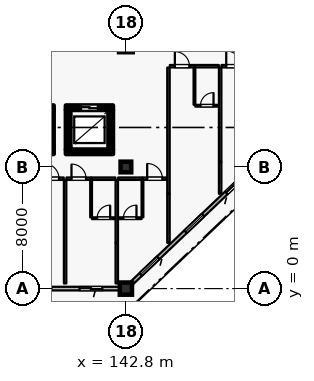
"""IFC4 building model, lengths in metres.
Left out: names, types, materials, properties, quantities, classifications, styles, units other than length and angle.
Written with IfcOpenShell. Run it as: python <this file> out.ifc"""

import sys

from ifc_helpers import new_model, si_unit, direction, frame, frame_2d, origin, origin_2d, place, context, subcontext, project, spatial, rectangle, extrude, element, fill, save


model = new_model("IFC4")
c1 = context("Model", 3, precision=1e-05, world=origin(), true_north=direction((0.0, 1.0)))
c2 = subcontext(c1, "Body", "Model", "MODEL_VIEW")
j1 = project(units=[si_unit("LENGTHUNIT", "METRE"), si_unit("PLANEANGLEUNIT", "RADIAN")], contexts=[c1])
p1 = place(None, origin())
s1 = spatial("IfcSite", under=j1, at=p1, CompositionType="ELEMENT")
p2 = place(p1, origin())
s2 = spatial("IfcBuilding", under=s1, at=p2, CompositionType="ELEMENT")
p3 = place(p2, frame((0.0, 0.0, 25.2)))
s3 = spatial("IfcBuildingStorey", under=s2, at=p3, CompositionType="ELEMENT", Elevation=25.2)
p4 = place(p3, frame((142.8, 0.0, 0.0), z_axis=(0.0, 0.0, 1.0), x_axis=(1.0, 0.0, 0.0)))
e1 = element("IfcColumn", 1, at=p4, inside=s3, PredefinedType="COLUMN", context=c2, shape_type="SweptSolid", body=[
    extrude(rectangle(XDim=0.8, YDim=0.8, at=origin_2d()), origin(), (0.0, 0.0, 1.0), 3.6),
])
p5 = place(p3, frame((142.8, 8.0, 0.0), z_axis=(0.0, 0.0, 1.0), x_axis=(1.0, 0.0, 0.0)))
e2 = element("IfcColumn", 2, at=p5, inside=s3, PredefinedType="COLUMN", context=c2, shape_type="SweptSolid", body=[
    extrude(rectangle(XDim=0.7, YDim=0.7, at=origin_2d()), origin(), (0.0, 0.0, 1.0), 3.6),
])
p6 = place(p3, frame((142.4, 0.0, 0.0), z_axis=(0.0, 0.0, 1.0), x_axis=(-1.0, 0.0, 0.0)))
e3 = element("IfcWall", 3, at=p6, inside=s3, PredefinedType="SOLIDWALL", context=c2, shape_type="SweptSolid", body=[
    extrude(rectangle(XDim=7.6, YDim=0.24, at=frame_2d((3.8, 0.0))), origin(), (0.0, 0.0, 1.0), 2.93),
])
p7 = place(p6, frame((1.15, 0.0, 0.0)))
e4 = element("IfcOpeningElement", 4, at=p7, cuts=e3, PredefinedType="OPENING", context=c2, shape_type="SweptSolid", body=[
    extrude(rectangle(XDim=1.5, YDim=2.25, at=frame_2d((0.75, 1.125))), frame((0.0, 0.13, 0.0), z_axis=(0.0, -1.0, 0.0), x_axis=(1.0, 0.0, 0.0)), (0.0, 0.0, 1.0), 0.26),
])
p8 = place(p6, frame((4.5, 0.0, 0.8)))
e5 = element("IfcOpeningElement", 5, at=p8, cuts=e3, PredefinedType="OPENING", context=c2, shape_type="SweptSolid", body=[
    extrude(rectangle(XDim=1.6, YDim=1.6, at=frame_2d((0.8, 0.8))), frame((0.0, 0.13, 0.0), z_axis=(0.0, -1.0, 0.0), x_axis=(1.0, 0.0, 0.0)), (0.0, 0.0, 1.0), 0.26),
])
p9 = place(p3, frame((150.8, 7.619, 0.0), z_axis=(0.0, 0.0, 1.0), x_axis=(-0.724156739794, -0.689635422677, 0.0)))
e6 = element("IfcWall", 6, at=p9, inside=s3, PredefinedType="SOLIDWALL", context=c2, shape_type="SweptSolid", body=[
    extrude(rectangle(XDim=10.495, YDim=0.24, at=frame_2d((5.248, 0.0))), origin(), (0.0, 0.0, 1.0), 2.93),
])
p10 = place(p9, frame((0.424, 0.0, 0.0)))
e7 = element("IfcOpeningElement", 7, at=p10, cuts=e6, PredefinedType="OPENING", context=c2, shape_type="SweptSolid", body=[
    extrude(rectangle(XDim=1.5, YDim=2.25, at=frame_2d((0.75, 1.125))), frame((0.0, 0.13, 0.0), z_axis=(0.0, -1.0, 0.0), x_axis=(1.0, 0.0, 0.0)), (0.0, 0.0, 1.0), 0.26),
])
p11 = place(p9, frame((4.033, 0.0, 0.8)))
e8 = element("IfcOpeningElement", 8, at=p11, cuts=e6, PredefinedType="OPENING", context=c2, shape_type="SweptSolid", body=[
    extrude(rectangle(XDim=1.6, YDim=1.6, at=frame_2d((0.8, 0.8))), frame((0.0, 0.13, 0.0), z_axis=(0.0, -1.0, 0.0), x_axis=(1.0, 0.0, 0.0)), (0.0, 0.0, 1.0), 0.26),
])
p12 = place(p9, frame((8.107, 0.0, 0.8)))
e9 = element("IfcOpeningElement", 9, at=p12, cuts=e6, PredefinedType="OPENING", context=c2, shape_type="SweptSolid", body=[
    extrude(rectangle(XDim=1.6, YDim=1.6, at=frame_2d((0.8, 0.8))), frame((0.0, 0.13, 0.0), z_axis=(0.0, -1.0, 0.0), x_axis=(1.0, 0.0, 0.0)), (0.0, 0.0, 1.0), 0.26),
])
p13 = place(p3, frame((134.95, 9.0, 0.0), z_axis=(0.0, 0.0, 1.0), x_axis=(1.0, 0.0, 0.0)))
e10 = element("IfcWall", 10, at=p13, inside=s3, PredefinedType="SHEAR", context=c2, shape_type="SweptSolid", body=[
    extrude(rectangle(XDim=3.1, YDim=0.3, at=frame_2d((1.55, 0.0))), origin(), (0.0, 0.0, 1.0), 3.335),
])
p14 = place(p3, frame((137.9, 9.155, 0.0), z_axis=(0.0, 0.0, 1.0), x_axis=(0.0, 1.0, 0.0)))
e11 = element("IfcWall", 11, at=p14, inside=s3, PredefinedType="SHEAR", context=c2, shape_type="SweptSolid", body=[
    extrude(rectangle(XDim=2.59, YDim=0.3, at=frame_2d((1.295, 0.0))), origin(), (0.0, 0.0, 1.0), 3.335),
])
p15 = place(p3, frame((138.05, 11.9, 0.0), z_axis=(0.0, 0.0, 1.0), x_axis=(-1.0, 0.0, 0.0)))
e12 = element("IfcWall", 12, at=p15, inside=s3, PredefinedType="SHEAR", context=c2, shape_type="SweptSolid", body=[
    extrude(rectangle(XDim=3.1, YDim=0.3, at=frame_2d((1.55, 0.0))), origin(), (0.0, 0.0, 1.0), 3.335),
])
p16 = place(p15, frame((1.0, 0.0, 0.0)))
e13 = element("IfcOpeningElement", 13, at=p16, cuts=e12, PredefinedType="OPENING", context=c2, shape_type="SweptSolid", body=[
    extrude(rectangle(XDim=1.1, YDim=2.2, at=frame_2d((0.55, 1.1))), frame((0.0, 0.16, 0.0), z_axis=(0.0, -1.0, 0.0), x_axis=(1.0, 0.0, 0.0)), (0.0, 0.0, 1.0), 0.32),
])
p17 = place(p3, frame((138.85, 9.0, 0.0), z_axis=(0.0, 0.0, 1.0), x_axis=(1.0, 0.0, 0.0)))
e14 = element("IfcWall", 14, at=p17, inside=s3, PredefinedType="SHEAR", context=c2, shape_type="SweptSolid", body=[
    extrude(rectangle(XDim=3.1, YDim=0.3, at=frame_2d((1.55, 0.0))), origin(), (0.0, 0.0, 1.0), 3.335),
])
p18 = place(p3, frame((141.8, 9.155, 0.0), z_axis=(0.0, 0.0, 1.0), x_axis=(0.0, 1.0, 0.0)))
e15 = element("IfcWall", 15, at=p18, inside=s3, PredefinedType="SHEAR", context=c2, shape_type="SweptSolid", body=[
    extrude(rectangle(XDim=2.59, YDim=0.3, at=frame_2d((1.295, 0.0))), origin(), (0.0, 0.0, 1.0), 3.335),
])
p19 = place(p3, frame((141.95, 11.9, 0.0), z_axis=(0.0, 0.0, 1.0), x_axis=(-1.0, 0.0, 0.0)))
e16 = element("IfcWall", 16, at=p19, inside=s3, PredefinedType="SHEAR", context=c2, shape_type="SweptSolid", body=[
    extrude(rectangle(XDim=3.1, YDim=0.3, at=frame_2d((1.55, 0.0))), origin(), (0.0, 0.0, 1.0), 3.335),
])
p20 = place(p19, frame((1.0, 0.0, 0.0)))
e17 = element("IfcOpeningElement", 17, at=p20, cuts=e16, PredefinedType="OPENING", context=c2, shape_type="SweptSolid", body=[
    extrude(rectangle(XDim=1.1, YDim=2.2, at=frame_2d((0.55, 1.1))), frame((0.0, 0.16, 0.0), z_axis=(0.0, -1.0, 0.0), x_axis=(1.0, 0.0, 0.0)), (0.0, 0.0, 1.0), 0.32),
])
p21 = place(p3, frame((139.0, 11.745, 0.0), z_axis=(0.0, 0.0, 1.0), x_axis=(0.0, -1.0, 0.0)))
e18 = element("IfcWall", 18, at=p21, inside=s3, PredefinedType="SHEAR", context=c2, shape_type="SweptSolid", body=[
    extrude(rectangle(XDim=2.59, YDim=0.3, at=frame_2d((1.295, 0.0))), origin(), (0.0, 0.0, 1.0), 3.335),
])
p22 = place(p3, frame((137.09, 7.23, 0.0), z_axis=(0.0, 0.0, 1.0), x_axis=(1.0, 0.0, 0.0)))
e19 = element("IfcWall", 19, at=p22, inside=s3, PredefinedType="PARTITIONING", context=c2, shape_type="SweptSolid", body=[
    extrude(rectangle(XDim=1.62, YDim=0.16, at=frame_2d((0.81, 0.0))), origin(), (0.0, 0.0, 1.0), 3.335),
])
p23 = place(p22, frame((0.31, 0.0, 0.0)))
e20 = element("IfcOpeningElement", 20, at=p23, cuts=e19, PredefinedType="OPENING", context=c2, shape_type="SweptSolid", body=[
    extrude(rectangle(XDim=1.0, YDim=2.25, at=frame_2d((0.5, 1.125))), frame((0.0, 0.09, 0.0), z_axis=(0.0, -1.0, 0.0), x_axis=(1.0, 0.0, 0.0)), (0.0, 0.0, 1.0), 0.18),
])
p24 = place(p3, frame((138.89, 7.23, 0.0), z_axis=(0.0, 0.0, 1.0), x_axis=(1.0, 0.0, 0.0)))
e21 = element("IfcWall", 21, at=p24, inside=s3, PredefinedType="PARTITIONING", context=c2, shape_type="SweptSolid", body=[
    extrude(rectangle(XDim=1.62, YDim=0.16, at=frame_2d((0.81, 0.0))), origin(), (0.0, 0.0, 1.0), 3.335),
])
p25 = place(p24, frame((0.33, 0.0, 0.0)))
e22 = element("IfcOpeningElement", 22, at=p25, cuts=e21, PredefinedType="OPENING", context=c2, shape_type="SweptSolid", body=[
    extrude(rectangle(XDim=0.96, YDim=2.2, at=frame_2d((0.48, 1.1))), frame((0.0, 0.09, 0.0), z_axis=(0.0, -1.0, 0.0), x_axis=(1.0, 0.0, 0.0)), (0.0, 0.0, 1.0), 0.18),
])
p26 = place(p3, frame((140.52, 7.23, 0.0), z_axis=(0.0, 0.0, 1.0), x_axis=(1.0, 0.0, 0.0)))
e23 = element("IfcWall", 23, at=p26, inside=s3, PredefinedType="PARTITIONING", context=c2, shape_type="SweptSolid", body=[
    extrude(rectangle(XDim=1.59, YDim=0.16, at=frame_2d((0.795, 0.0))), origin(), (0.0, 0.0, 1.0), 3.335),
])
p27 = place(p3, frame((140.51, 4.69, 0.0), z_axis=(0.0, 0.0, 1.0), x_axis=(0.0, 1.0, 0.0)))
e24 = element("IfcWall", 24, at=p27, inside=s3, PredefinedType="PARTITIONING", context=c2, shape_type="SweptSolid", body=[
    extrude(rectangle(XDim=2.45, YDim=0.115, at=frame_2d((1.225, 0.0))), origin(), (0.0, 0.0, 1.0), 3.335),
])
p28 = place(p3, frame((140.57, 4.63, 0.0), z_axis=(0.0, 0.0, 1.0), x_axis=(1.0, 0.0, 0.0)))
e25 = element("IfcWall", 25, at=p28, inside=s3, PredefinedType="PARTITIONING", context=c2, shape_type="SweptSolid", body=[
    extrude(rectangle(XDim=1.53, YDim=0.115, at=frame_2d((0.765, 0.0))), origin(), (0.0, 0.0, 1.0), 3.335),
])
p29 = place(p28, frame((0.335, 0.0, 0.0)))
e26 = element("IfcOpeningElement", 26, at=p29, cuts=e25, PredefinedType="OPENING", context=c2, shape_type="SweptSolid", body=[
    extrude(rectangle(XDim=0.86, YDim=2.12, at=frame_2d((0.43, 1.06))), frame((0.0, 0.067, 0.0), z_axis=(0.0, -1.0, 0.0), x_axis=(1.0, 0.0, 0.0)), (0.0, 0.0, 1.0), 0.135),
])
p30 = place(p3, frame((138.8, 0.34, 0.0), z_axis=(0.0, 0.0, 1.0), x_axis=(0.0, 1.0, 0.0)))
e27 = element("IfcWall", 27, at=p30, inside=s3, PredefinedType="PARTITIONING", context=c2, shape_type="SweptSolid", body=[
    extrude(rectangle(XDim=6.8, YDim=0.16, at=frame_2d((3.4, 0.0))), origin(), (0.0, 0.0, 1.0), 3.335),
])
p31 = place(p3, frame((142.2, 0.34, 0.0), z_axis=(0.0, 0.0, 1.0), x_axis=(0.0, 1.0, 0.0)))
e28 = element("IfcWall", 28, at=p31, inside=s3, PredefinedType="PARTITIONING", context=c2, shape_type="SweptSolid", body=[
    extrude(rectangle(XDim=2.66, YDim=0.16, at=frame_2d((1.33, 0.0))), origin(), (0.0, 0.0, 1.0), 3.335),
])
p32 = place(p3, frame((142.29, 7.23, 0.0), z_axis=(0.0, 0.0, 1.0), x_axis=(1.0, 0.0, 0.0)))
e29 = element("IfcWall", 29, at=p32, inside=s3, PredefinedType="PARTITIONING", context=c2, shape_type="SweptSolid", body=[
    extrude(rectangle(XDim=1.59, YDim=0.16, at=frame_2d((0.795, 0.0))), origin(), (0.0, 0.0, 1.0), 3.335),
])
p33 = place(p3, frame((143.89, 7.23, 0.0), z_axis=(0.0, 0.0, 1.0), x_axis=(1.0, 0.0, 0.0)))
e30 = element("IfcWall", 30, at=p33, inside=s3, PredefinedType="PARTITIONING", context=c2, shape_type="SweptSolid", body=[
    extrude(rectangle(XDim=1.62, YDim=0.16, at=frame_2d((0.81, 0.0))), origin(), (0.0, 0.0, 1.0), 3.335),
])
p34 = place(p33, frame((0.31, 0.0, 0.0)))
e31 = element("IfcOpeningElement", 31, at=p34, cuts=e30, PredefinedType="OPENING", context=c2, shape_type="SweptSolid", body=[
    extrude(rectangle(XDim=1.0, YDim=2.25, at=frame_2d((0.5, 1.125))), frame((0.0, 0.09, 0.0), z_axis=(0.0, -1.0, 0.0), x_axis=(1.0, 0.0, 0.0)), (0.0, 0.0, 1.0), 0.18),
])
p35 = place(p3, frame((143.89, 4.69, 0.0), z_axis=(0.0, 0.0, 1.0), x_axis=(0.0, 1.0, 0.0)))
e32 = element("IfcWall", 32, at=p35, inside=s3, PredefinedType="PARTITIONING", context=c2, shape_type="SweptSolid", body=[
    extrude(rectangle(XDim=2.45, YDim=0.115, at=frame_2d((1.225, 0.0))), origin(), (0.0, 0.0, 1.0), 3.335),
])
p36 = place(p3, frame((142.3, 4.63, 0.0), z_axis=(0.0, 0.0, 1.0), x_axis=(1.0, 0.0, 0.0)))
e33 = element("IfcWall", 33, at=p36, inside=s3, PredefinedType="PARTITIONING", context=c2, shape_type="SweptSolid", body=[
    extrude(rectangle(XDim=1.53, YDim=0.115, at=frame_2d((0.765, 0.0))), origin(), (0.0, 0.0, 1.0), 3.335),
])
p37 = place(p36, frame((0.335, 0.0, 0.0)))
e34 = element("IfcOpeningElement", 34, at=p37, cuts=e33, PredefinedType="OPENING", context=c2, shape_type="SweptSolid", body=[
    extrude(rectangle(XDim=0.86, YDim=2.12, at=frame_2d((0.43, 1.06))), frame((0.0, 0.067, 0.0), z_axis=(0.0, -1.0, 0.0), x_axis=(1.0, 0.0, 0.0)), (0.0, 0.0, 1.0), 0.135),
])
p38 = place(p3, frame((142.2, 3.01, 0.0), z_axis=(0.0, 0.0, 1.0), x_axis=(0.0, 1.0, 0.0)))
e35 = element("IfcWall", 35, at=p38, inside=s3, PredefinedType="PARTITIONING", context=c2, shape_type="SweptSolid", body=[
    extrude(rectangle(XDim=4.13, YDim=0.16, at=frame_2d((2.065, 0.0))), origin(), (0.0, 0.0, 1.0), 3.335),
])
p39 = place(p3, frame((145.6, 3.01, 0.0), z_axis=(0.0, 0.0, 1.0), x_axis=(0.0, 1.0, 0.0)))
e36 = element("IfcWall", 36, at=p39, inside=s3, PredefinedType="PARTITIONING", context=c2, shape_type="SweptSolid", body=[
    extrude(rectangle(XDim=3.22, YDim=0.16, at=frame_2d((1.61, 0.0))), origin(), (0.0, 0.0, 1.0), 3.335),
])
p40 = place(p3, frame((145.69, 14.63, 0.0), z_axis=(0.0, 0.0, 1.0), x_axis=(1.0, 0.0, 0.0)))
e37 = element("IfcWall", 37, at=p40, inside=s3, PredefinedType="PARTITIONING", context=c2, shape_type="SweptSolid", body=[
    extrude(rectangle(XDim=1.62, YDim=0.16, at=frame_2d((0.81, 0.0))), origin(), (0.0, 0.0, 1.0), 3.335),
])
p41 = place(p40, frame((0.33, 0.0, 0.0)))
e38 = element("IfcOpeningElement", 38, at=p41, cuts=e37, PredefinedType="OPENING", context=c2, shape_type="SweptSolid", body=[
    extrude(rectangle(XDim=0.96, YDim=2.2, at=frame_2d((0.48, 1.1))), frame((0.0, 0.09, 0.0), z_axis=(0.0, -1.0, 0.0), x_axis=(1.0, 0.0, 0.0)), (0.0, 0.0, 1.0), 0.18),
])
p42 = place(p3, frame((147.32, 14.63, 0.0), z_axis=(0.0, 0.0, 1.0), x_axis=(1.0, 0.0, 0.0)))
e39 = element("IfcWall", 39, at=p42, inside=s3, PredefinedType="PARTITIONING", context=c2, shape_type="SweptSolid", body=[
    extrude(rectangle(XDim=1.59, YDim=0.16, at=frame_2d((0.795, 0.0))), origin(), (0.0, 0.0, 1.0), 3.335),
])
p43 = place(p3, frame((147.31, 12.09, 0.0), z_axis=(0.0, 0.0, 1.0), x_axis=(0.0, 1.0, 0.0)))
e40 = element("IfcWall", 40, at=p43, inside=s3, PredefinedType="PARTITIONING", context=c2, shape_type="SweptSolid", body=[
    extrude(rectangle(XDim=2.45, YDim=0.115, at=frame_2d((1.225, 0.0))), origin(), (0.0, 0.0, 1.0), 3.335),
])
p44 = place(p3, frame((147.37, 12.03, 0.0), z_axis=(0.0, 0.0, 1.0), x_axis=(1.0, 0.0, 0.0)))
e41 = element("IfcWall", 41, at=p44, inside=s3, PredefinedType="PARTITIONING", context=c2, shape_type="SweptSolid", body=[
    extrude(rectangle(XDim=1.53, YDim=0.115, at=frame_2d((0.765, 0.0))), origin(), (0.0, 0.0, 1.0), 3.335),
])
p45 = place(p44, frame((0.335, 0.0, 0.0)))
e42 = element("IfcOpeningElement", 42, at=p45, cuts=e41, PredefinedType="OPENING", context=c2, shape_type="SweptSolid", body=[
    extrude(rectangle(XDim=0.86, YDim=2.12, at=frame_2d((0.43, 1.06))), frame((0.0, 0.067, 0.0), z_axis=(0.0, -1.0, 0.0), x_axis=(1.0, 0.0, 0.0)), (0.0, 0.0, 1.0), 0.135),
])
p46 = place(p3, frame((145.6, 6.24, 0.0), z_axis=(0.0, 0.0, 1.0), x_axis=(0.0, 1.0, 0.0)))
e43 = element("IfcWall", 43, at=p46, inside=s3, PredefinedType="PARTITIONING", context=c2, shape_type="SweptSolid", body=[
    extrude(rectangle(XDim=8.3, YDim=0.16, at=frame_2d((4.15, 0.0))), origin(), (0.0, 0.0, 1.0), 3.335),
])
p47 = place(p3, frame((149.0, 6.24, 0.0), z_axis=(0.0, 0.0, 1.0), x_axis=(0.0, 1.0, 0.0)))
e44 = element("IfcWall", 44, at=p47, inside=s3, PredefinedType="PARTITIONING", context=c2, shape_type="SweptSolid", body=[
    extrude(rectangle(XDim=2.09, YDim=0.16, at=frame_2d((1.045, 0.0))), origin(), (0.0, 0.0, 1.0), 3.335),
])
p48 = place(p3, frame((149.09, 14.63, 0.0), z_axis=(0.0, 0.0, 1.0), x_axis=(1.0, 0.0, 0.0)))
e45 = element("IfcWall", 45, at=p48, inside=s3, PredefinedType="PARTITIONING", context=c2, shape_type="SweptSolid", body=[
    extrude(rectangle(XDim=1.62, YDim=0.16, at=frame_2d((0.81, 0.0))), origin(), (0.0, 0.0, 1.0), 3.335),
])
p49 = place(p48, frame((0.31, 0.0, 0.0)))
e46 = element("IfcOpeningElement", 46, at=p49, cuts=e45, PredefinedType="OPENING", context=c2, shape_type="SweptSolid", body=[
    extrude(rectangle(XDim=1.0, YDim=2.25, at=frame_2d((0.5, 1.125))), frame((0.0, 0.09, 0.0), z_axis=(0.0, -1.0, 0.0), x_axis=(1.0, 0.0, 0.0)), (0.0, 0.0, 1.0), 0.18),
])
p50 = place(p3, frame((149.0, 8.34, 0.0), z_axis=(0.0, 0.0, 1.0), x_axis=(0.0, 1.0, 0.0)))
e47 = element("IfcWall", 47, at=p50, inside=s3, PredefinedType="PARTITIONING", context=c2, shape_type="SweptSolid", body=[
    extrude(rectangle(XDim=6.2, YDim=0.16, at=frame_2d((3.1, 0.0))), origin(), (0.0, 0.0, 1.0), 3.335),
])
p51 = place(p7, origin())
e48 = element("IfcDoor", 48, at=p51, inside=s3, OperationType="SLIDING_TO_LEFT", PredefinedType="DOOR", context=c2, shape_type="SweptSolid", body=[
    extrude(rectangle(XDim=1.5, YDim=2.25, at=frame_2d((0.75, 1.125))), frame((0.0, 0.025, 0.0), z_axis=(0.0, -1.0, 0.0), x_axis=(1.0, 0.0, 0.0)), (0.0, 0.0, 1.0), 0.05),
])
fill(e4, e48)
p52 = place(p10, origin())
e49 = element("IfcDoor", 49, at=p52, inside=s3, OperationType="SLIDING_TO_LEFT", PredefinedType="DOOR", context=c2, shape_type="SweptSolid", body=[
    extrude(rectangle(XDim=1.5, YDim=2.25, at=frame_2d((0.75, 1.125))), frame((0.0, 0.025, 0.0), z_axis=(0.0, -1.0, 0.0), x_axis=(1.0, 0.0, 0.0)), (0.0, 0.0, 1.0), 0.05),
])
fill(e7, e49)
p53 = place(p11, origin())
e50 = element("IfcWindow", 50, at=p53, inside=s3, PartitioningType="SINGLE_PANEL", PredefinedType="WINDOW", context=c2, shape_type="SweptSolid", body=[
    extrude(rectangle(XDim=1.6, YDim=1.6, at=frame_2d((0.8, 0.8))), frame((0.0, 0.03, 0.0), z_axis=(0.0, -1.0, 0.0), x_axis=(1.0, 0.0, 0.0)), (0.0, 0.0, 1.0), 0.06),
])
fill(e8, e50)
p54 = place(p12, origin())
e51 = element("IfcWindow", 51, at=p54, inside=s3, PartitioningType="SINGLE_PANEL", PredefinedType="WINDOW", context=c2, shape_type="SweptSolid", body=[
    extrude(rectangle(XDim=1.6, YDim=1.6, at=frame_2d((0.8, 0.8))), frame((0.0, 0.03, 0.0), z_axis=(0.0, -1.0, 0.0), x_axis=(1.0, 0.0, 0.0)), (0.0, 0.0, 1.0), 0.06),
])
fill(e9, e51)
p55 = place(p20, origin())
e52 = element("IfcDoor", 52, at=p55, inside=s3, OperationType="DOUBLE_DOOR_SLIDING", PredefinedType="DOOR", context=c2, shape_type="SweptSolid", body=[
    extrude(rectangle(XDim=1.1, YDim=2.2, at=frame_2d((0.55, 1.1))), frame((0.0, 0.025, 0.0), z_axis=(0.0, -1.0, 0.0), x_axis=(1.0, 0.0, 0.0)), (0.0, 0.0, 1.0), 0.05),
])
fill(e17, e52)
p56 = place(p23, origin())
e53 = element("IfcDoor", 53, at=p56, inside=s3, OperationType="SINGLE_SWING_LEFT", PredefinedType="DOOR", context=c2, shape_type="SweptSolid", body=[
    extrude(rectangle(XDim=1.0, YDim=2.25, at=frame_2d((0.5, 1.125))), frame((0.0, 0.025, 0.0), z_axis=(0.0, -1.0, 0.0), x_axis=(1.0, 0.0, 0.0)), (0.0, 0.0, 1.0), 0.05),
])
fill(e20, e53)
p57 = place(p25, origin())
e54 = element("IfcDoor", 54, at=p57, inside=s3, OperationType="SINGLE_SWING_LEFT", PredefinedType="DOOR", context=c2, shape_type="SweptSolid", body=[
    extrude(rectangle(XDim=0.96, YDim=2.2, at=frame_2d((0.48, 1.1))), frame((0.0, 0.025, 0.0), z_axis=(0.0, -1.0, 0.0), x_axis=(1.0, 0.0, 0.0)), (0.0, 0.0, 1.0), 0.05),
])
fill(e22, e54)
p58 = place(p29, origin())
e55 = element("IfcDoor", 55, at=p58, inside=s3, OperationType="SINGLE_SWING_RIGHT", PredefinedType="DOOR", context=c2, shape_type="SweptSolid", body=[
    extrude(rectangle(XDim=0.86, YDim=2.12, at=frame_2d((0.43, 1.06))), frame((0.0, 0.025, 0.0), z_axis=(0.0, -1.0, 0.0), x_axis=(1.0, 0.0, 0.0)), (0.0, 0.0, 1.0), 0.05),
])
fill(e26, e55)
p59 = place(p34, origin())
e56 = element("IfcDoor", 56, at=p59, inside=s3, OperationType="SINGLE_SWING_LEFT", PredefinedType="DOOR", context=c2, shape_type="SweptSolid", body=[
    extrude(rectangle(XDim=1.0, YDim=2.25, at=frame_2d((0.5, 1.125))), frame((0.0, 0.025, 0.0), z_axis=(0.0, -1.0, 0.0), x_axis=(1.0, 0.0, 0.0)), (0.0, 0.0, 1.0), 0.05),
])
fill(e31, e56)
p60 = place(p37, origin())
e57 = element("IfcDoor", 57, at=p60, inside=s3, OperationType="SINGLE_SWING_RIGHT", PredefinedType="DOOR", context=c2, shape_type="SweptSolid", body=[
    extrude(rectangle(XDim=0.86, YDim=2.12, at=frame_2d((0.43, 1.06))), frame((0.0, 0.025, 0.0), z_axis=(0.0, -1.0, 0.0), x_axis=(1.0, 0.0, 0.0)), (0.0, 0.0, 1.0), 0.05),
])
fill(e34, e57)
p61 = place(p41, origin())
e58 = element("IfcDoor", 58, at=p61, inside=s3, OperationType="SINGLE_SWING_LEFT", PredefinedType="DOOR", context=c2, shape_type="SweptSolid", body=[
    extrude(rectangle(XDim=0.96, YDim=2.2, at=frame_2d((0.48, 1.1))), frame((0.0, 0.025, 0.0), z_axis=(0.0, -1.0, 0.0), x_axis=(1.0, 0.0, 0.0)), (0.0, 0.0, 1.0), 0.05),
])
fill(e38, e58)
p62 = place(p45, origin())
e59 = element("IfcDoor", 59, at=p62, inside=s3, OperationType="SINGLE_SWING_RIGHT", PredefinedType="DOOR", context=c2, shape_type="SweptSolid", body=[
    extrude(rectangle(XDim=0.86, YDim=2.12, at=frame_2d((0.43, 1.06))), frame((0.0, 0.025, 0.0), z_axis=(0.0, -1.0, 0.0), x_axis=(1.0, 0.0, 0.0)), (0.0, 0.0, 1.0), 0.05),
])
fill(e42, e59)
p63 = place(p49, origin())
e60 = element("IfcDoor", 60, at=p63, inside=s3, OperationType="SINGLE_SWING_LEFT", PredefinedType="DOOR", context=c2, shape_type="SweptSolid", body=[
    extrude(rectangle(XDim=1.0, YDim=2.25, at=frame_2d((0.5, 1.125))), frame((0.0, 0.025, 0.0), z_axis=(0.0, -1.0, 0.0), x_axis=(1.0, 0.0, 0.0)), (0.0, 0.0, 1.0), 0.05),
])
fill(e46, e60)
save(model, sys.argv[1])
